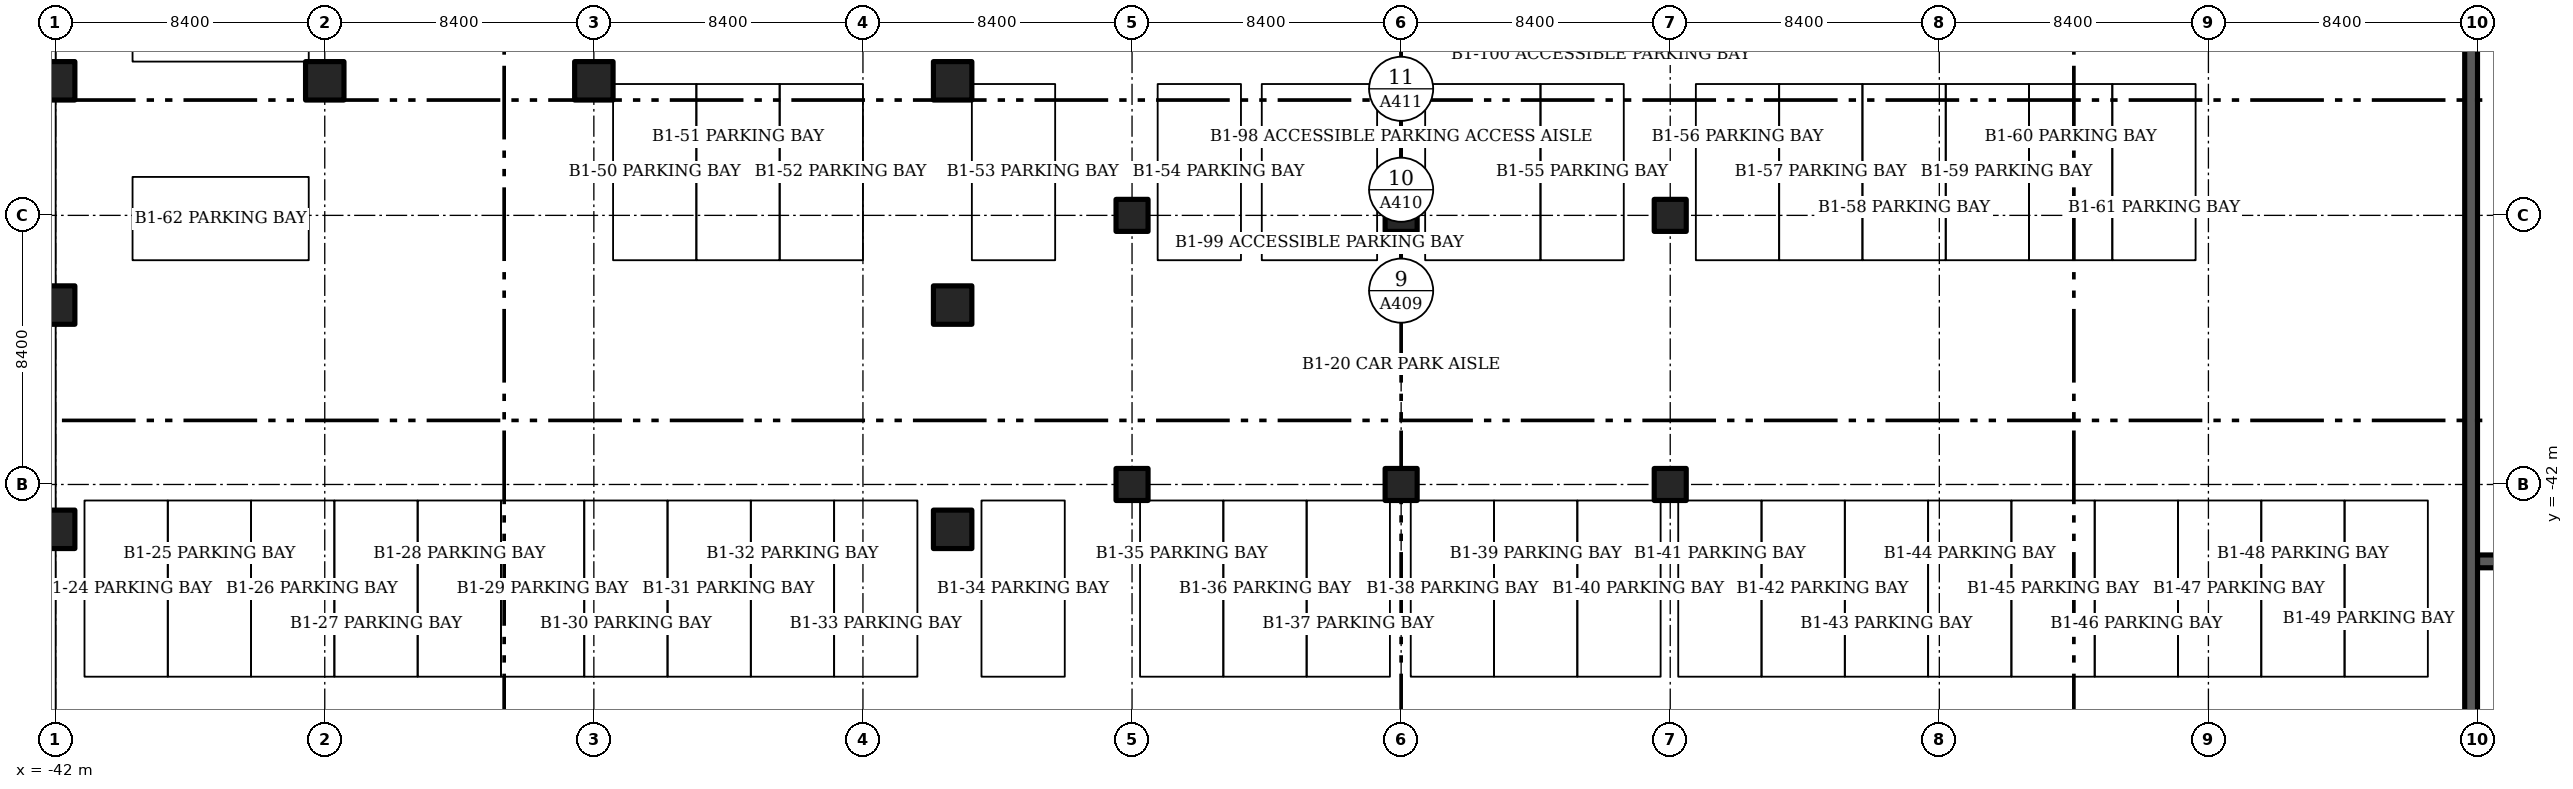
"""IFC4 building model, lengths in metres.
Left out: names, types, materials, properties, quantities, classifications, styles, units other than length and angle.
Written with IfcOpenShell. Run it as: python <this file> out.ifc"""

import sys

from ifc_helpers import new_model, si_unit, direction, frame, frame_2d, origin, origin_2d, place, context, subcontext, project, spatial, rectangle, extrude, element, save


model = new_model("IFC4")
c1 = context("Model", 3, precision=1e-05, world=origin(), true_north=direction((0.0, 1.0)))
c2 = subcontext(c1, "Body", "Model", "MODEL_VIEW")
j1 = project(units=[si_unit("LENGTHUNIT", "METRE"), si_unit("PLANEANGLEUNIT", "RADIAN")], contexts=[c1])
p1 = place(None, origin())
s1 = spatial("IfcSite", under=j1, at=p1, CompositionType="ELEMENT")
p2 = place(p1, origin())
s2 = spatial("IfcBuilding", under=s1, at=p2, CompositionType="ELEMENT")
p3 = place(p2, frame((0.0, 0.0, -5.0)))
s3 = spatial("IfcBuildingStorey", under=s2, at=p3, CompositionType="ELEMENT", Elevation=-5.0)
for number, where, z_axis, x_axis in (
    (1, (-8.4, -42.0, -0.3), (0.0, 0.0, 1.0), (1.0, 0.0, 0.0)),
    (2, (-8.4, -33.6, -0.3), (0.0, 0.0, 1.0), (1.0, 0.0, 0.0)),
    (3, (0.0, -42.0, -0.3), (0.0, 0.0, 1.0), (1.0, 0.0, 0.0)),
    (4, (0.0, -33.6, -0.3), (0.0, 0.0, 1.0), (1.0, 0.0, 0.0)),
    (5, (8.4, -42.0, -0.3), (0.0, 0.0, 1.0), (1.0, 0.0, 0.0)),
    (6, (8.4, -33.6, -0.3), (0.0, 0.0, 1.0), (1.0, 0.0, 0.0)),
):
    element("IfcColumn", number, at=place(p3, frame(where, z_axis=z_axis, x_axis=x_axis)), inside=s3, PredefinedType="COLUMN", context=c2, shape_type="SweptSolid", body=[
        extrude(rectangle(XDim=1.0, YDim=1.0, at=origin_2d()), origin(), (0.0, 0.0, 1.0), 4.95),
    ])
for number, where, z_axis, x_axis in (
    (7, (-14.0, -43.4, -0.3), (0.0, 0.0, 1.0), (1.0, 0.0, 0.0)),
    (8, (-42.0, -43.4, -0.3), (0.0, 0.0, 1.0), (1.0, 0.0, 0.0)),
    (9, (-14.0, -36.4, -0.3), (0.0, 0.0, 1.0), (1.0, 0.0, 0.0)),
    (10, (-42.0, -36.4, -0.3), (0.0, 0.0, 1.0), (1.0, 0.0, 0.0)),
    (11, (-14.0, -29.4, -0.3), (0.0, 0.0, 1.0), (1.0, 0.0, 0.0)),
    (12, (-42.0, -29.4, -0.3), (0.0, 0.0, 1.0), (1.0, 0.0, 0.0)),
    (13, (-33.6, -29.4, -0.3), (0.0, 0.0, 1.0), (1.0, 0.0, 0.0)),
    (14, (-25.2, -29.4, -0.3), (0.0, 0.0, 1.0), (1.0, 0.0, 0.0)),
):
    element("IfcColumn", number, at=place(p3, frame(where, z_axis=z_axis, x_axis=x_axis)), inside=s3, PredefinedType="COLUMN", context=c2, shape_type="SweptSolid", body=[
        extrude(rectangle(XDim=1.2, YDim=1.2, at=origin_2d()), origin(), (0.0, 0.0, 1.0), 4.95),
    ])
p4 = place(p3, frame((33.6, -44.4, -0.3), z_axis=(0.0, 0.0, 1.0), x_axis=(1.0, 0.0, 0.0)))
e15 = element("IfcWall", 15, at=p4, inside=s3, PredefinedType="SOLIDWALL", context=c2, shape_type="SweptSolid", body=[
    extrude(rectangle(XDim=5.8, YDim=0.4, at=frame_2d((2.9, 0.0))), origin(), (0.0, 0.0, 1.0), 4.5),
])
p5 = place(p3, frame((33.4, -50.4, 0.0), z_axis=(0.0, 0.0, 1.0), x_axis=(0.0, 1.0, 0.0)))
e16 = element("IfcWall", 16, at=p5, inside=s3, PredefinedType="SOLIDWALL", context=c2, shape_type="SweptSolid", body=[
    extrude(rectangle(XDim=36.0, YDim=0.4, at=frame_2d((18.0, 0.0))), origin(), (0.0, 0.0, 1.0), 5.0),
])
save(model, sys.argv[1])
